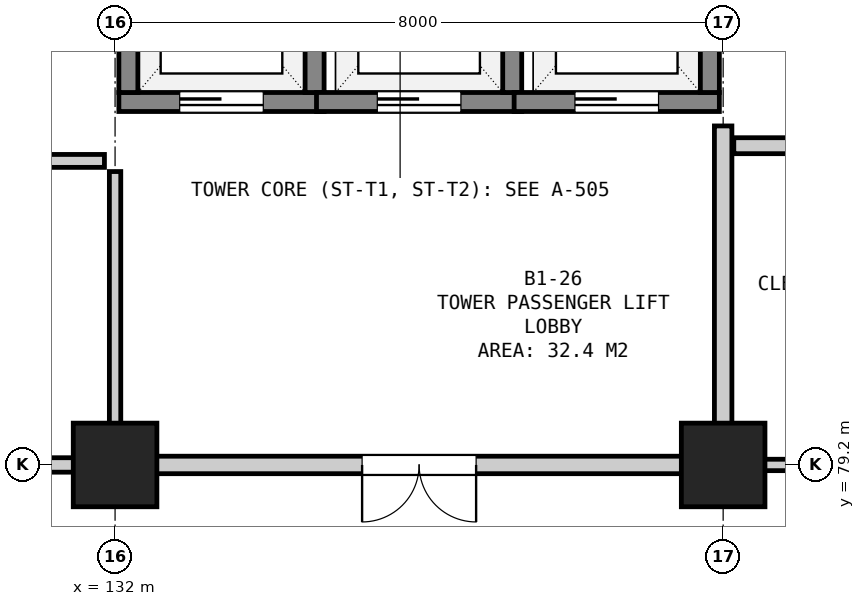
"""IFC4 building model, lengths in metres.
Left out: names, types, materials, properties, quantities, classifications, styles, units other than length and angle.
Written with IfcOpenShell. Run it as: python <this file> out.ifc"""

import sys

from ifc_helpers import new_model, si_unit, direction, frame, frame_2d, origin, origin_2d, place, context, subcontext, project, spatial, rectangle, extrude, element, fill, save


model = new_model("IFC4")
c1 = context("Model", 3, precision=1e-05, world=origin(), true_north=direction((0.0, 1.0)))
c2 = subcontext(c1, "Body", "Model", "MODEL_VIEW")
j1 = project(units=[si_unit("LENGTHUNIT", "METRE"), si_unit("PLANEANGLEUNIT", "RADIAN")], contexts=[c1])
p1 = place(None, origin())
s1 = spatial("IfcSite", under=j1, at=p1, CompositionType="ELEMENT")
p2 = place(p1, origin())
s2 = spatial("IfcBuilding", under=s1, at=p2, CompositionType="ELEMENT")
p3 = place(p2, frame((0.0, 0.0, -4.5)))
s3 = spatial("IfcBuildingStorey", under=s2, at=p3, CompositionType="ELEMENT", Elevation=-4.5)
for number, where, z_axis, x_axis in (
    (1, (132.0, 79.2, 0.0), (0.0, 0.0, 1.0), (1.0, 0.0, 0.0)),
    (2, (140.0, 79.2, 0.0), (0.0, 0.0, 1.0), (1.0, 0.0, 0.0)),
):
    element("IfcColumn", number, at=place(p3, frame(where, z_axis=z_axis, x_axis=x_axis)), inside=s3, PredefinedType="COLUMN", context=c2, shape_type="SweptSolid", body=[
        extrude(rectangle(XDim=1.1, YDim=1.1, at=origin_2d()), origin(), (0.0, 0.0, 1.0), 4.5),
    ])
p4 = place(p3, frame((132.05, 83.975, 0.0), z_axis=(0.0, 0.0, 1.0), x_axis=(1.0, 0.0, 0.0)))
e3 = element("IfcWall", 3, at=p4, inside=s3, PredefinedType="SHEAR", context=c2, shape_type="SweptSolid", body=[
    extrude(rectangle(XDim=2.7, YDim=0.25, at=frame_2d((1.35, 0.0))), origin(), (0.0, 0.0, 1.0), 4.08),
])
p5 = place(p4, frame((0.8, 0.0, 0.0)))
e4 = element("IfcOpeningElement", 4, at=p5, cuts=e3, PredefinedType="OPENING", context=c2, shape_type="SweptSolid", body=[
    extrude(rectangle(XDim=1.1, YDim=2.15, at=frame_2d((0.55, 1.075))), frame((0.0, 0.137, 0.0), z_axis=(0.0, -1.0, 0.0), x_axis=(1.0, 0.0, 0.0)), (0.0, 0.0, 1.0), 0.274),
])
for number, where, z_axis, x_axis in (
    (5, (132.175, 84.1, 0.0), (0.0, 0.0, 1.0), (0.0, 1.0, 0.0)),
    (6, (134.625, 84.1, 0.0), (0.0, 0.0, 1.0), (0.0, 1.0, 0.0)),
):
    element("IfcWall", number, at=place(p3, frame(where, z_axis=z_axis, x_axis=x_axis)), inside=s3, PredefinedType="SHEAR", context=c2, shape_type="SweptSolid", body=[
        extrude(rectangle(XDim=2.6, YDim=0.25, at=frame_2d((1.3, 0.0))), origin(), (0.0, 0.0, 1.0), 4.08),
    ])
p6 = place(p3, frame((134.65, 83.975, 0.0), z_axis=(0.0, 0.0, 1.0), x_axis=(1.0, 0.0, 0.0)))
e7 = element("IfcWall", 7, at=p6, inside=s3, PredefinedType="SHEAR", context=c2, shape_type="SweptSolid", body=[
    extrude(rectangle(XDim=2.7, YDim=0.25, at=frame_2d((1.35, 0.0))), origin(), (0.0, 0.0, 1.0), 4.08),
])
p7 = place(p6, frame((0.8, 0.0, 0.0)))
e8 = element("IfcOpeningElement", 8, at=p7, cuts=e7, PredefinedType="OPENING", context=c2, shape_type="SweptSolid", body=[
    extrude(rectangle(XDim=1.1, YDim=2.15, at=frame_2d((0.55, 1.075))), frame((0.0, 0.137, 0.0), z_axis=(0.0, -1.0, 0.0), x_axis=(1.0, 0.0, 0.0)), (0.0, 0.0, 1.0), 0.274),
])
p8 = place(p3, frame((137.225, 84.1, 0.0), z_axis=(0.0, 0.0, 1.0), x_axis=(0.0, 1.0, 0.0)))
e9 = element("IfcWall", 9, at=p8, inside=s3, PredefinedType="SHEAR", context=c2, shape_type="SweptSolid", body=[
    extrude(rectangle(XDim=2.6, YDim=0.25, at=frame_2d((1.3, 0.0))), origin(), (0.0, 0.0, 1.0), 4.08),
])
p9 = place(p3, frame((137.25, 83.975, 0.0), z_axis=(0.0, 0.0, 1.0), x_axis=(1.0, 0.0, 0.0)))
e10 = element("IfcWall", 10, at=p9, inside=s3, PredefinedType="SHEAR", context=c2, shape_type="SweptSolid", body=[
    extrude(rectangle(XDim=2.7, YDim=0.25, at=frame_2d((1.35, 0.0))), origin(), (0.0, 0.0, 1.0), 4.08),
])
p10 = place(p9, frame((0.8, 0.0, 0.0)))
e11 = element("IfcOpeningElement", 11, at=p10, cuts=e10, PredefinedType="OPENING", context=c2, shape_type="SweptSolid", body=[
    extrude(rectangle(XDim=1.1, YDim=2.15, at=frame_2d((0.55, 1.075))), frame((0.0, 0.137, 0.0), z_axis=(0.0, -1.0, 0.0), x_axis=(1.0, 0.0, 0.0)), (0.0, 0.0, 1.0), 0.274),
])
p11 = place(p3, frame((139.825, 84.1, 0.0), z_axis=(0.0, 0.0, 1.0), x_axis=(0.0, 1.0, 0.0)))
e12 = element("IfcWall", 12, at=p11, inside=s3, PredefinedType="SHEAR", context=c2, shape_type="SweptSolid", body=[
    extrude(rectangle(XDim=2.6, YDim=0.25, at=frame_2d((1.3, 0.0))), origin(), (0.0, 0.0, 1.0), 4.08),
])
p12 = place(p3, frame((128.34, 79.2, 0.0), z_axis=(0.0, 0.0, 1.0), x_axis=(1.0, 0.0, 0.0)))
e13 = element("IfcWall", 13, at=p12, inside=s3, PredefinedType="PARTITIONING", context=c2, shape_type="SweptSolid", body=[
    extrude(rectangle(XDim=3.52, YDim=0.19, at=frame_2d((1.76, 0.0))), origin(), (0.0, 0.0, 1.0), 3.225),
])
p13 = place(p12, frame((1.235, 0.0, 0.0)))
e14 = element("IfcOpeningElement", 14, at=p13, cuts=e13, PredefinedType="OPENING", context=c2, shape_type="SweptSolid", body=[
    extrude(rectangle(XDim=1.05, YDim=2.15, at=frame_2d((0.525, 1.075))), frame((0.0, 0.107, 0.0), z_axis=(0.0, -1.0, 0.0), x_axis=(1.0, 0.0, 0.0)), (0.0, 0.0, 1.0), 0.214),
])
p14 = place(p3, frame((128.34, 83.2, 0.0), z_axis=(0.0, 0.0, 1.0), x_axis=(1.0, 0.0, 0.0)))
e15 = element("IfcWall", 15, at=p14, inside=s3, PredefinedType="PARTITIONING", context=c2, shape_type="SweptSolid", body=[
    extrude(rectangle(XDim=3.52, YDim=0.17, at=frame_2d((1.76, 0.0))), origin(), (0.0, 0.0, 1.0), 4.08),
])
p15 = place(p3, frame((132.0, 79.34, 0.0), z_axis=(0.0, 0.0, 1.0), x_axis=(0.0, 1.0, 0.0)))
e16 = element("IfcWall", 16, at=p15, inside=s3, PredefinedType="PARTITIONING", context=c2, shape_type="SweptSolid", body=[
    extrude(rectangle(XDim=3.72, YDim=0.15, at=frame_2d((1.86, 0.0))), origin(), (0.0, 0.0, 1.0), 3.375),
])
p16 = place(p3, frame((132.14, 79.2, 0.0), z_axis=(0.0, 0.0, 1.0), x_axis=(1.0, 0.0, 0.0)))
e17 = element("IfcWall", 17, at=p16, inside=s3, PredefinedType="SOLIDWALL", context=c2, shape_type="SweptSolid", body=[
    extrude(rectangle(XDim=7.72, YDim=0.23, at=frame_2d((3.86, 0.0))), origin(), (0.0, 0.0, 1.0), 3.275),
])
p17 = place(p16, frame((3.11, 0.0, 0.0)))
e18 = element("IfcOpeningElement", 18, at=p17, cuts=e17, PredefinedType="OPENING", context=c2, shape_type="SweptSolid", body=[
    extrude(rectangle(XDim=1.5, YDim=2.2, at=frame_2d((0.75, 1.1))), frame((0.0, 0.127, 0.0), z_axis=(0.0, -1.0, 0.0), x_axis=(1.0, 0.0, 0.0)), (0.0, 0.0, 1.0), 0.254),
])
p18 = place(p3, frame((140.0, 79.34, 0.0), z_axis=(0.0, 0.0, 1.0), x_axis=(0.0, 1.0, 0.0)))
e19 = element("IfcWall", 19, at=p18, inside=s3, PredefinedType="SOLIDWALL", context=c2, shape_type="SweptSolid", body=[
    extrude(rectangle(XDim=4.32, YDim=0.23, at=frame_2d((2.16, 0.0))), origin(), (0.0, 0.0, 1.0), 3.425),
])
p19 = place(p3, frame((140.14, 83.4, 0.0), z_axis=(0.0, 0.0, 1.0), x_axis=(1.0, 0.0, 0.0)))
e20 = element("IfcWall", 20, at=p19, inside=s3, PredefinedType="SOLIDWALL", context=c2, shape_type="SweptSolid", body=[
    extrude(rectangle(XDim=7.72, YDim=0.21, at=frame_2d((3.86, 0.0))), origin(), (0.0, 0.0, 1.0), 4.08),
])
p20 = place(p3, frame((140.14, 79.2, 0.0), z_axis=(0.0, 0.0, 1.0), x_axis=(1.0, 0.0, 0.0)))
e21 = element("IfcWall", 21, at=p20, inside=s3, PredefinedType="PARTITIONING", context=c2, shape_type="SweptSolid", body=[
    extrude(rectangle(XDim=7.72, YDim=0.15, at=frame_2d((3.86, 0.0))), origin(), (0.0, 0.0, 1.0), 3.325),
])
p21 = place(p20, frame((3.36, 0.0, 0.0)))
e22 = element("IfcOpeningElement", 22, at=p21, cuts=e21, PredefinedType="OPENING", context=c2, shape_type="SweptSolid", body=[
    extrude(rectangle(XDim=1.0, YDim=2.15, at=frame_2d((0.5, 1.075))), frame((0.0, 0.087, 0.0), z_axis=(0.0, -1.0, 0.0), x_axis=(1.0, 0.0, 0.0)), (0.0, 0.0, 1.0), 0.174),
])
p22 = place(p5, origin())
e23 = element("IfcDoor", 23, at=p22, inside=s3, OperationType="SLIDING_TO_LEFT", PredefinedType="DOOR", context=c2, shape_type="SweptSolid", body=[
    extrude(rectangle(XDim=1.1, YDim=2.15, at=frame_2d((0.55, 1.075))), frame((0.0, 0.025, 0.0), z_axis=(0.0, -1.0, 0.0), x_axis=(1.0, 0.0, 0.0)), (0.0, 0.0, 1.0), 0.05),
])
fill(e4, e23)
p23 = place(p7, origin())
e24 = element("IfcDoor", 24, at=p23, inside=s3, OperationType="SLIDING_TO_LEFT", PredefinedType="DOOR", context=c2, shape_type="SweptSolid", body=[
    extrude(rectangle(XDim=1.1, YDim=2.15, at=frame_2d((0.55, 1.075))), frame((0.0, 0.025, 0.0), z_axis=(0.0, -1.0, 0.0), x_axis=(1.0, 0.0, 0.0)), (0.0, 0.0, 1.0), 0.05),
])
fill(e8, e24)
p24 = place(p10, origin())
e25 = element("IfcDoor", 25, at=p24, inside=s3, OperationType="SLIDING_TO_LEFT", PredefinedType="DOOR", context=c2, shape_type="SweptSolid", body=[
    extrude(rectangle(XDim=1.1, YDim=2.15, at=frame_2d((0.55, 1.075))), frame((0.0, 0.025, 0.0), z_axis=(0.0, -1.0, 0.0), x_axis=(1.0, 0.0, 0.0)), (0.0, 0.0, 1.0), 0.05),
])
fill(e11, e25)
p25 = place(p17, frame((1.5, 0.0, 0.0), z_axis=(0.0, 0.0, 1.0), x_axis=(-1.0, 0.0, 0.0)))
e26 = element("IfcDoor", 26, at=p25, inside=s3, OperationType="DOUBLE_DOOR_SINGLE_SWING", PredefinedType="DOOR", context=c2, shape_type="SweptSolid", body=[
    extrude(rectangle(XDim=1.5, YDim=2.2, at=frame_2d((0.75, 1.1))), frame((0.0, 0.025, 0.0), z_axis=(0.0, -1.0, 0.0), x_axis=(1.0, 0.0, 0.0)), (0.0, 0.0, 1.0), 0.05),
])
fill(e18, e26)
save(model, sys.argv[1])
